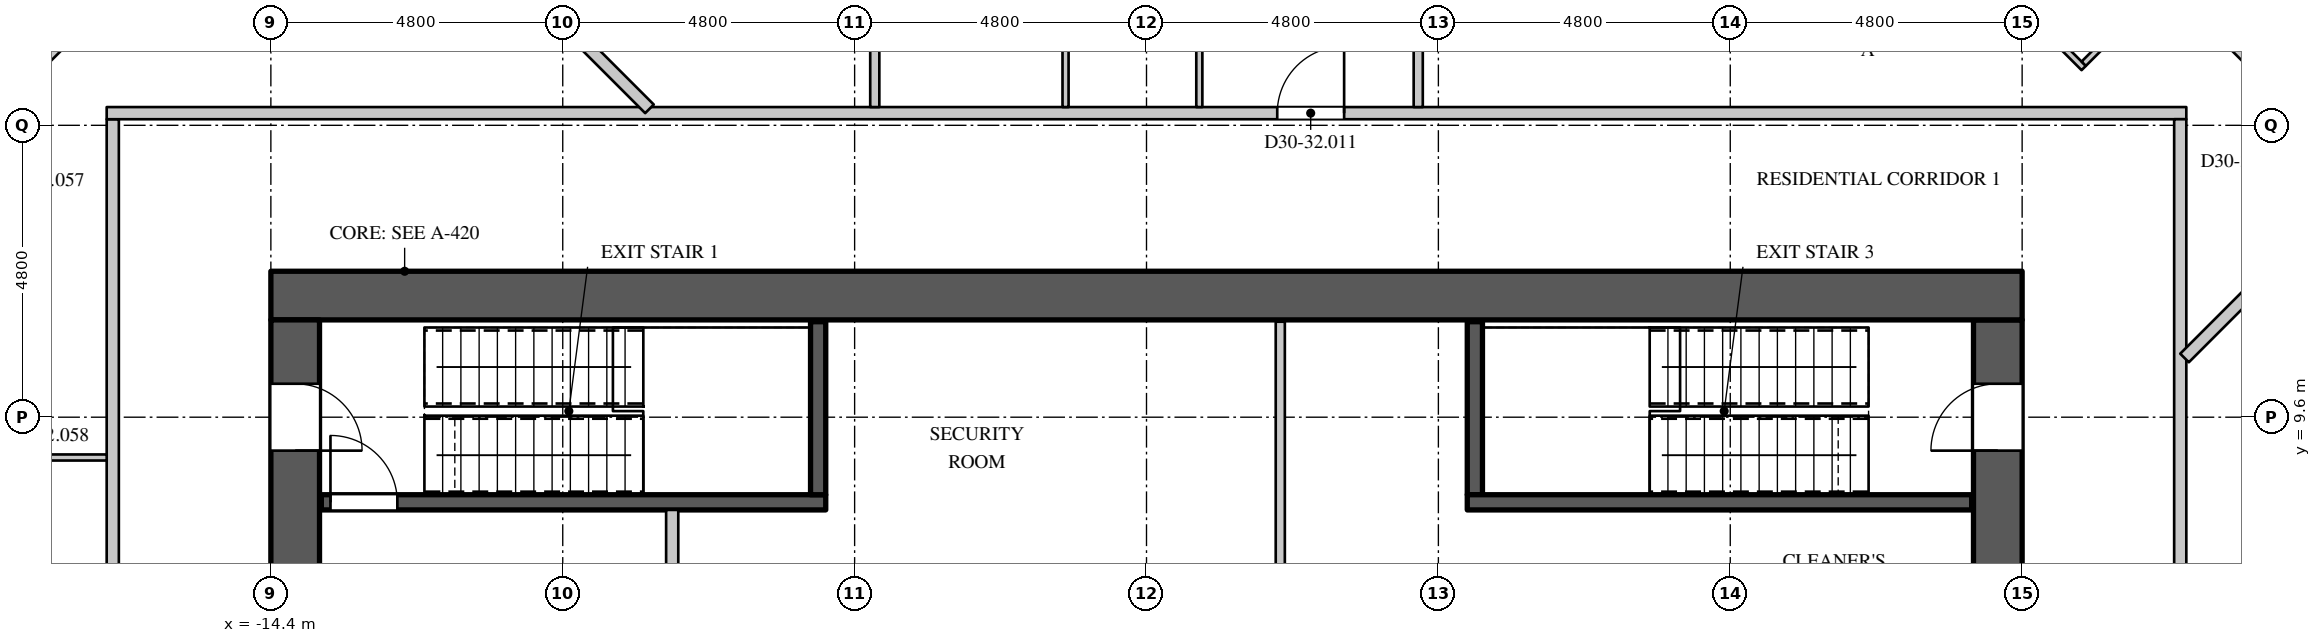
"""IFC4 building model, lengths in metres.
Left out: names, types, materials, properties, quantities, classifications, styles, units other than length and angle.
Written with IfcOpenShell. Run it as: python <this file> out.ifc"""

import sys

from ifc_helpers import new_model, si_unit, direction, frame, frame_2d, origin, place, context, subcontext, project, spatial, rectangle, extrude, element, fill, save


model = new_model("IFC4")
c1 = context("Model", 3, precision=1e-05, world=origin(), true_north=direction((0.0, 1.0)))
c2 = subcontext(c1, "Body", "Model", "MODEL_VIEW")
j1 = project(units=[si_unit("LENGTHUNIT", "METRE"), si_unit("PLANEANGLEUNIT", "RADIAN")], contexts=[c1])
p1 = place(None, origin())
s1 = spatial("IfcSite", under=j1, at=p1, CompositionType="ELEMENT")
p2 = place(p1, origin())
s2 = spatial("IfcBuilding", under=s1, at=p2, CompositionType="ELEMENT")
p3 = place(p2, frame((0.0, 0.0, 131.7)))
s3 = spatial("IfcBuildingStorey", under=s2, at=p3, CompositionType="ELEMENT", Elevation=131.7)
p4 = place(p3, frame((-14.4, 11.6, 0.0), z_axis=(0.0, 0.0, 1.0), x_axis=(1.0, 0.0, 0.0)))
e1 = element("IfcWall", 1, at=p4, inside=s3, PredefinedType="SHEAR", context=c2, shape_type="SweptSolid", body=[
    extrude(rectangle(XDim=28.8, YDim=0.8, at=frame_2d((14.4, 0.0))), origin(), (0.0, 0.0, 1.0), 4.2),
])
p5 = place(p3, frame((14.0, -11.2, 0.0), z_axis=(0.0, 0.0, 1.0), x_axis=(0.0, 1.0, 0.0)))
e2 = element("IfcWall", 2, at=p5, inside=s3, PredefinedType="SHEAR", context=c2, shape_type="SweptSolid", body=[
    extrude(rectangle(XDim=22.4, YDim=0.8, at=frame_2d((11.2, 0.0))), origin(), (0.0, 0.0, 1.0), 4.2),
])
p6 = place(p5, frame((20.25, 0.0, 0.0)))
e3 = element("IfcOpeningElement", 3, at=p6, cuts=e2, PredefinedType="OPENING", context=c2, shape_type="SweptSolid", body=[
    extrude(rectangle(XDim=1.1, YDim=2.2, at=frame_2d((0.55, 1.1))), frame((0.0, 0.41, 0.0), z_axis=(0.0, -1.0, 0.0), x_axis=(1.0, 0.0, 0.0)), (0.0, 0.0, 1.0), 0.82),
])
p7 = place(p5, frame((1.05, 0.0, 0.0)))
e4 = element("IfcOpeningElement", 4, at=p7, cuts=e2, PredefinedType="OPENING", context=c2, shape_type="SweptSolid", body=[
    extrude(rectangle(XDim=1.1, YDim=2.2, at=frame_2d((0.55, 1.1))), frame((0.0, 0.41, 0.0), z_axis=(0.0, -1.0, 0.0), x_axis=(1.0, 0.0, 0.0)), (0.0, 0.0, 1.0), 0.82),
])
p8 = place(p5, frame((14.75, 0.0, 0.0)))
e5 = element("IfcOpeningElement", 5, at=p8, cuts=e2, PredefinedType="OPENING", context=c2, shape_type="SweptSolid", body=[
    extrude(rectangle(XDim=1.5, YDim=2.4, at=frame_2d((0.75, 1.2))), frame((0.0, 0.41, 0.0), z_axis=(0.0, -1.0, 0.0), x_axis=(1.0, 0.0, 0.0)), (0.0, 0.0, 1.0), 0.82),
])
p9 = place(p5, frame((6.15, 0.0, 0.0)))
e6 = element("IfcOpeningElement", 6, at=p9, cuts=e2, PredefinedType="OPENING", context=c2, shape_type="SweptSolid", body=[
    extrude(rectangle(XDim=1.5, YDim=2.4, at=frame_2d((0.75, 1.2))), frame((0.0, 0.41, 0.0), z_axis=(0.0, -1.0, 0.0), x_axis=(1.0, 0.0, 0.0)), (0.0, 0.0, 1.0), 0.82),
])
p10 = place(p3, frame((-14.0, -11.2, 0.0), z_axis=(0.0, 0.0, 1.0), x_axis=(0.0, 1.0, 0.0)))
e7 = element("IfcWall", 7, at=p10, inside=s3, PredefinedType="SHEAR", context=c2, shape_type="SweptSolid", body=[
    extrude(rectangle(XDim=22.4, YDim=0.8, at=frame_2d((11.2, 0.0))), origin(), (0.0, 0.0, 1.0), 4.2),
])
p11 = place(p10, frame((20.25, 0.0, 0.0)))
e8 = element("IfcOpeningElement", 8, at=p11, cuts=e7, PredefinedType="OPENING", context=c2, shape_type="SweptSolid", body=[
    extrude(rectangle(XDim=1.1, YDim=2.2, at=frame_2d((0.55, 1.1))), frame((0.0, 0.41, 0.0), z_axis=(0.0, -1.0, 0.0), x_axis=(1.0, 0.0, 0.0)), (0.0, 0.0, 1.0), 0.82),
])
p12 = place(p10, frame((1.05, 0.0, 0.0)))
e9 = element("IfcOpeningElement", 9, at=p12, cuts=e7, PredefinedType="OPENING", context=c2, shape_type="SweptSolid", body=[
    extrude(rectangle(XDim=1.1, YDim=2.2, at=frame_2d((0.55, 1.1))), frame((0.0, 0.41, 0.0), z_axis=(0.0, -1.0, 0.0), x_axis=(1.0, 0.0, 0.0)), (0.0, 0.0, 1.0), 0.82),
])
p13 = place(p10, frame((15.95, 0.0, 0.0)))
e10 = element("IfcOpeningElement", 10, at=p13, cuts=e7, PredefinedType="OPENING", context=c2, shape_type="SweptSolid", body=[
    extrude(rectangle(XDim=1.5, YDim=2.4, at=frame_2d((0.75, 1.2))), frame((0.0, 0.41, 0.0), z_axis=(0.0, -1.0, 0.0), x_axis=(1.0, 0.0, 0.0)), (0.0, 0.0, 1.0), 0.82),
])
p14 = place(p10, frame((4.95, 0.0, 0.0)))
e11 = element("IfcOpeningElement", 11, at=p14, cuts=e7, PredefinedType="OPENING", context=c2, shape_type="SweptSolid", body=[
    extrude(rectangle(XDim=1.5, YDim=2.4, at=frame_2d((0.75, 1.2))), frame((0.0, 0.41, 0.0), z_axis=(0.0, -1.0, 0.0), x_axis=(1.0, 0.0, 0.0)), (0.0, 0.0, 1.0), 0.82),
])
p15 = place(p3, frame((-17.0, -14.5, 0.0), z_axis=(0.0, 0.0, 1.0), x_axis=(0.0, 1.0, 0.0)))
e12 = element("IfcWall", 12, at=p15, inside=s3, PredefinedType="PARTITIONING", context=c2, shape_type="SweptSolid", body=[
    extrude(rectangle(XDim=29.0, YDim=0.2, at=frame_2d((14.5, 0.0))), origin(), (0.0, 0.0, 1.0), 3.95),
])
p16 = place(p15, frame((15.95, 0.0, 0.0)))
e13 = element("IfcOpeningElement", 13, at=p16, cuts=e12, PredefinedType="OPENING", context=c2, shape_type="SweptSolid", body=[
    extrude(rectangle(XDim=1.1, YDim=2.4, at=frame_2d((0.55, 1.2))), frame((0.0, 0.11, 0.0), z_axis=(0.0, -1.0, 0.0), x_axis=(1.0, 0.0, 0.0)), (0.0, 0.0, 1.0), 0.22),
])
p17 = place(p3, frame((-17.1, 14.6, 0.0), z_axis=(0.0, 0.0, 1.0), x_axis=(1.0, 0.0, 0.0)))
e14 = element("IfcWall", 14, at=p17, inside=s3, PredefinedType="PARTITIONING", context=c2, shape_type="SweptSolid", body=[
    extrude(rectangle(XDim=34.2, YDim=0.2, at=frame_2d((17.1, 0.0))), origin(), (0.0, 0.0, 1.0), 3.95),
])
p18 = place(p17, frame((19.25, 0.0, 0.0)))
e15 = element("IfcOpeningElement", 15, at=p18, cuts=e14, PredefinedType="OPENING", context=c2, shape_type="SweptSolid", body=[
    extrude(rectangle(XDim=1.1, YDim=2.4, at=frame_2d((0.55, 1.2))), frame((0.0, 0.11, 0.0), z_axis=(0.0, -1.0, 0.0), x_axis=(1.0, 0.0, 0.0)), (0.0, 0.0, 1.0), 0.22),
])
p19 = place(p3, frame((-7.8, 2.8, 0.0), z_axis=(0.0, 0.0, 1.0), x_axis=(0.0, 1.0, 0.0)))
e16 = element("IfcWall", 16, at=p19, inside=s3, PredefinedType="PARTITIONING", context=c2, shape_type="SweptSolid", body=[
    extrude(rectangle(XDim=5.275, YDim=0.2, at=frame_2d((2.637, 0.0))), origin(), (0.0, 0.0, 1.0), 3.95),
])
p20 = place(p19, frame((0.75, 0.0, 0.0)))
e17 = element("IfcOpeningElement", 17, at=p20, cuts=e16, PredefinedType="OPENING", context=c2, shape_type="SweptSolid", body=[
    extrude(rectangle(XDim=1.5, YDim=2.4, at=frame_2d((0.75, 1.2))), frame((0.0, 0.11, 0.0), z_axis=(0.0, -1.0, 0.0), x_axis=(1.0, 0.0, 0.0)), (0.0, 0.0, 1.0), 0.22),
])
p21 = place(p3, frame((17.0, -14.5, 0.0), z_axis=(0.0, 0.0, 1.0), x_axis=(0.0, 1.0, 0.0)))
e18 = element("IfcWall", 18, at=p21, inside=s3, PredefinedType="PARTITIONING", context=c2, shape_type="SweptSolid", body=[
    extrude(rectangle(XDim=29.0, YDim=0.2, at=frame_2d((14.5, 0.0))), origin(), (0.0, 0.0, 1.0), 3.95),
])
p22 = place(p21, frame((11.8, 0.0, 0.0)))
e19 = element("IfcOpeningElement", 19, at=p22, cuts=e18, PredefinedType="OPENING", context=c2, shape_type="SweptSolid", body=[
    extrude(rectangle(XDim=1.1, YDim=2.4, at=frame_2d((0.55, 1.2))), frame((0.0, 0.11, 0.0), z_axis=(0.0, -1.0, 0.0), x_axis=(1.0, 0.0, 0.0)), (0.0, 0.0, 1.0), 0.22),
])
p23 = place(p3, frame((-21.947, 11.636, 0.0), z_axis=(0.0, 0.0, 1.0), x_axis=(0.707106781187, 0.707106781187, 0.0)))
e20 = element("IfcWall", 20, at=p23, inside=s3, PredefinedType="PARTITIONING", context=c2, shape_type="SweptSolid", body=[
    extrude(rectangle(XDim=11.885, YDim=0.15, at=frame_2d((5.942, 0.0))), origin(), (0.0, 0.0, 1.0), 3.95),
])
p24 = place(p23, frame((9.1, 0.0, 0.0)))
e21 = element("IfcOpeningElement", 21, at=p24, cuts=e20, PredefinedType="OPENING", context=c2, shape_type="SweptSolid", body=[
    extrude(rectangle(XDim=0.95, YDim=2.2, at=frame_2d((0.475, 1.1))), frame((0.0, 0.085, 0.0), z_axis=(0.0, -1.0, 0.0), x_axis=(1.0, 0.0, 0.0)), (0.0, 0.0, 1.0), 0.17),
])
p25 = place(p23, frame((3.1, 0.0, 0.0)))
e22 = element("IfcOpeningElement", 22, at=p25, cuts=e20, PredefinedType="OPENING", context=c2, shape_type="SweptSolid", body=[
    extrude(rectangle(XDim=0.95, YDim=2.2, at=frame_2d((0.475, 1.1))), frame((0.0, 0.085, 0.0), z_axis=(0.0, -1.0, 0.0), x_axis=(1.0, 0.0, 0.0)), (0.0, 0.0, 1.0), 0.17),
])
p26 = place(p3, frame((-4.469, 14.7, 0.0), z_axis=(0.0, 0.0, 1.0), x_axis=(0.0, 1.0, 0.0)))
e23 = element("IfcWall", 23, at=p26, inside=s3, PredefinedType="PARTITIONING", context=c2, shape_type="SweptSolid", body=[
    extrude(rectangle(XDim=10.95, YDim=0.15, at=frame_2d((5.475, 0.0))), origin(), (0.0, 0.0, 1.0), 3.3),
])
p27 = place(p26, frame((2.65, 0.0, 0.0)))
e24 = element("IfcOpeningElement", 24, at=p27, cuts=e23, PredefinedType="OPENING", context=c2, shape_type="SweptSolid", body=[
    extrude(rectangle(XDim=0.95, YDim=2.2, at=frame_2d((0.475, 1.1))), frame((0.0, 0.085, 0.0), z_axis=(0.0, -1.0, 0.0), x_axis=(1.0, 0.0, 0.0)), (0.0, 0.0, 1.0), 0.17),
])
p28 = place(p3, frame((2.2, 5.9, 0.0), z_axis=(0.0, 0.0, 1.0), x_axis=(0.0, 1.0, 0.0)))
e25 = element("IfcWall", 25, at=p28, inside=s3, PredefinedType="PARTITIONING", context=c2, shape_type="SweptSolid", body=[
    extrude(rectangle(XDim=5.27, YDim=0.15, at=frame_2d((2.635, 0.0))), origin(), (0.0, 0.0, 1.0), 3.95),
])
p29 = place(p3, frame((4.469, 14.7, 0.0), z_axis=(0.0, 0.0, 1.0), x_axis=(0.0, 1.0, 0.0)))
e26 = element("IfcWall", 26, at=p29, inside=s3, PredefinedType="PARTITIONING", context=c2, shape_type="SweptSolid", body=[
    extrude(rectangle(XDim=10.95, YDim=0.15, at=frame_2d((5.475, 0.0))), origin(), (0.0, 0.0, 1.0), 3.3),
])
p30 = place(p29, frame((2.65, 0.0, 0.0)))
e27 = element("IfcOpeningElement", 27, at=p30, cuts=e26, PredefinedType="OPENING", context=c2, shape_type="SweptSolid", body=[
    extrude(rectangle(XDim=0.95, YDim=2.2, at=frame_2d((0.475, 1.1))), frame((0.0, 0.085, 0.0), z_axis=(0.0, -1.0, 0.0), x_axis=(1.0, 0.0, 0.0)), (0.0, 0.0, 1.0), 0.17),
])
p31 = place(p3, frame((16.792, 16.792, 0.0), z_axis=(0.0, 0.0, 1.0), x_axis=(0.707106781187, -0.707106781187, 0.0)))
e28 = element("IfcWall", 28, at=p31, inside=s3, PredefinedType="PARTITIONING", context=c2, shape_type="SweptSolid", body=[
    extrude(rectangle(XDim=4.594, YDim=0.15, at=frame_2d((2.297, 0.0))), origin(), (0.0, 0.0, 1.0), 3.95),
])
p32 = place(p31, frame((3.25, 0.0, 0.0)))
e29 = element("IfcOpeningElement", 29, at=p32, cuts=e28, PredefinedType="OPENING", context=c2, shape_type="SweptSolid", body=[
    extrude(rectangle(XDim=0.95, YDim=2.2, at=frame_2d((0.475, 1.1))), frame((0.0, 0.085, 0.0), z_axis=(0.0, -1.0, 0.0), x_axis=(1.0, 0.0, 0.0)), (0.0, 0.0, 1.0), 0.17),
])
p33 = place(p3, frame((-16.693, 23.19, 0.0), z_axis=(0.0, 0.0, 1.0), x_axis=(0.707106781187, -0.707106781187, 0.0)))
e30 = element("IfcWall", 30, at=p33, inside=s3, PredefinedType="PARTITIONING", context=c2, shape_type="SweptSolid", body=[
    extrude(rectangle(XDim=12.049, YDim=0.2, at=frame_2d((6.024, 0.0))), origin(), (0.0, 0.0, 1.0), 3.95),
])
p34 = place(p3, frame((17.071, 10.574, 0.0), z_axis=(0.0, 0.0, 1.0), x_axis=(0.707106781187, 0.707106781187, 0.0)))
e31 = element("IfcWall", 31, at=p34, inside=s3, PredefinedType="PARTITIONING", context=c2, shape_type="SweptSolid", body=[
    extrude(rectangle(XDim=8.655, YDim=0.2, at=frame_2d((4.327, 0.0))), origin(), (0.0, 0.0, 1.0), 3.95),
])
p35 = place(p3, frame((-13.57, 8.2, 0.0), z_axis=(0.0, 0.0, 1.0), x_axis=(1.0, 0.0, 0.0)))
e32 = element("IfcWall", 32, at=p35, inside=s3, PredefinedType="SHEAR", context=c2, shape_type="SweptSolid", body=[
    extrude(rectangle(XDim=8.295, YDim=0.25, at=frame_2d((4.147, 0.0))), origin(), (0.0, 0.0, 1.0), 3.95),
])
p36 = place(p35, frame((0.15, 0.0, 0.0)))
e33 = element("IfcOpeningElement", 33, at=p36, cuts=e32, PredefinedType="OPENING", context=c2, shape_type="SweptSolid", body=[
    extrude(rectangle(XDim=1.1, YDim=2.2, at=frame_2d((0.55, 1.1))), frame((0.0, 0.135, 0.0), z_axis=(0.0, -1.0, 0.0), x_axis=(1.0, 0.0, 0.0)), (0.0, 0.0, 1.0), 0.27),
])
for number, where, z_axis, x_axis in (
    (34, (-5.4, 8.325, 0.0), (0.0, 0.0, 1.0), (0.0, 1.0, 0.0)),
    (35, (5.4, 8.325, 0.0), (0.0, 0.0, 1.0), (0.0, 1.0, 0.0)),
):
    element("IfcWall", number, at=place(p3, frame(where, z_axis=z_axis, x_axis=x_axis)), inside=s3, PredefinedType="SHEAR", context=c2, shape_type="SweptSolid", body=[
        extrude(rectangle(XDim=2.845, YDim=0.25, at=frame_2d((1.422, 0.0))), origin(), (0.0, 0.0, 1.0), 3.95),
    ])
p37 = place(p3, frame((5.275, 8.2, 0.0), z_axis=(0.0, 0.0, 1.0), x_axis=(1.0, 0.0, 0.0)))
e36 = element("IfcWall", 36, at=p37, inside=s3, PredefinedType="SHEAR", context=c2, shape_type="SweptSolid", body=[
    extrude(rectangle(XDim=8.295, YDim=0.25, at=frame_2d((4.147, 0.0))), origin(), (0.0, 0.0, 1.0), 3.95),
])
p38 = place(p3, frame((-20.98, 8.937, 0.0), z_axis=(0.0, 0.0, 1.0), x_axis=(1.0, 0.0, 0.0)))
e37 = element("IfcWall", 37, at=p38, inside=s3, PredefinedType="PARTITIONING", context=c2, shape_type="SweptSolid", body=[
    extrude(rectangle(XDim=3.88, YDim=0.1, at=frame_2d((1.94, 0.0))), origin(), (0.0, 0.0, 1.0), 3.95),
])
p39 = place(p38, frame((1.05, 0.0, 0.0)))
e38 = element("IfcOpeningElement", 38, at=p39, cuts=e37, PredefinedType="OPENING", context=c2, shape_type="SweptSolid", body=[
    extrude(rectangle(XDim=0.9, YDim=2.2, at=frame_2d((0.45, 1.1))), frame((0.0, 0.06, 0.0), z_axis=(0.0, -1.0, 0.0), x_axis=(1.0, 0.0, 0.0)), (0.0, 0.0, 1.0), 0.12),
])
p40 = place(p3, frame((-1.331, 14.7, 0.0), z_axis=(0.0, 0.0, 1.0), x_axis=(0.0, 1.0, 0.0)))
e39 = element("IfcWall", 39, at=p40, inside=s3, PredefinedType="PARTITIONING", context=c2, shape_type="SweptSolid", body=[
    extrude(rectangle(XDim=6.225, YDim=0.1, at=frame_2d((3.113, 0.0))), origin(), (0.0, 0.0, 1.0), 3.95),
])
p41 = place(p3, frame((0.869, 14.7, 0.0), z_axis=(0.0, 0.0, 1.0), x_axis=(0.0, 1.0, 0.0)))
e40 = element("IfcWall", 40, at=p41, inside=s3, PredefinedType="PARTITIONING", context=c2, shape_type="SweptSolid", body=[
    extrude(rectangle(XDim=6.225, YDim=0.1, at=frame_2d((3.113, 0.0))), origin(), (0.0, 0.0, 1.0), 3.95),
])
p42 = place(p41, frame((2.65, 0.0, 0.0)))
e41 = element("IfcOpeningElement", 41, at=p42, cuts=e40, PredefinedType="OPENING", context=c2, shape_type="SweptSolid", body=[
    extrude(rectangle(XDim=0.9, YDim=2.2, at=frame_2d((0.45, 1.1))), frame((0.0, 0.06, 0.0), z_axis=(0.0, -1.0, 0.0), x_axis=(1.0, 0.0, 0.0)), (0.0, 0.0, 1.0), 0.12),
])
p43 = place(p3, frame((13.433, 17.322, 0.0), z_axis=(0.0, 0.0, 1.0), x_axis=(0.707106781187, -0.707106781187, 0.0)))
e42 = element("IfcWall", 42, at=p43, inside=s3, PredefinedType="PARTITIONING", context=c2, shape_type="SweptSolid", body=[
    extrude(rectangle(XDim=2.8, YDim=0.1, at=frame_2d((1.4, 0.0))), origin(), (0.0, 0.0, 1.0), 3.95),
])
p44 = place(p3, frame((15.413, 15.413, 0.0), z_axis=(0.0, 0.0, 1.0), x_axis=(0.707106781187, 0.707106781187, 0.0)))
e43 = element("IfcWall", 43, at=p44, inside=s3, PredefinedType="PARTITIONING", context=c2, shape_type="SweptSolid", body=[
    extrude(rectangle(XDim=1.93, YDim=0.1, at=frame_2d((0.965, 0.0))), origin(), (0.0, 0.0, 1.0), 3.95),
])
p45 = place(p36, origin())
e44 = element("IfcDoor", 44, at=p45, inside=s3, OperationType="SINGLE_SWING_LEFT", PredefinedType="DOOR", context=c2, shape_type="SweptSolid", body=[
    extrude(rectangle(XDim=1.1, YDim=2.2, at=frame_2d((0.55, 1.1))), frame((0.0, 0.025, 0.0), z_axis=(0.0, -1.0, 0.0), x_axis=(1.0, 0.0, 0.0)), (0.0, 0.0, 1.0), 0.05),
])
fill(e33, e44)
p46 = place(p11, origin())
e45 = element("IfcDoor", 45, at=p46, inside=s3, OperationType="SINGLE_SWING_RIGHT", PredefinedType="DOOR", context=c2, shape_type="SweptSolid", body=[
    extrude(rectangle(XDim=1.1, YDim=2.2, at=frame_2d((0.55, 1.1))), frame((0.0, -0.345, 0.0), z_axis=(0.0, -1.0, 0.0), x_axis=(1.0, 0.0, 0.0)), (0.0, 0.0, 1.0), 0.05),
])
fill(e8, e45)
p47 = place(p6, origin())
e46 = element("IfcDoor", 46, at=p47, inside=s3, OperationType="SINGLE_SWING_LEFT", PredefinedType="DOOR", context=c2, shape_type="SweptSolid", body=[
    extrude(rectangle(XDim=1.1, YDim=2.2, at=frame_2d((0.55, 1.1))), frame((0.0, 0.395, 0.0), z_axis=(0.0, -1.0, 0.0), x_axis=(1.0, 0.0, 0.0)), (0.0, 0.0, 1.0), 0.05),
])
fill(e3, e46)
p48 = place(p18, origin())
e47 = element("IfcDoor", 47, at=p48, inside=s3, OperationType="SINGLE_SWING_RIGHT", PredefinedType="DOOR", context=c2, shape_type="SweptSolid", body=[
    extrude(rectangle(XDim=1.1, YDim=2.4, at=frame_2d((0.55, 1.2))), frame((0.0, 0.025, 0.0), z_axis=(0.0, -1.0, 0.0), x_axis=(1.0, 0.0, 0.0)), (0.0, 0.0, 1.0), 0.05),
])
fill(e15, e47)
save(model, sys.argv[1])
